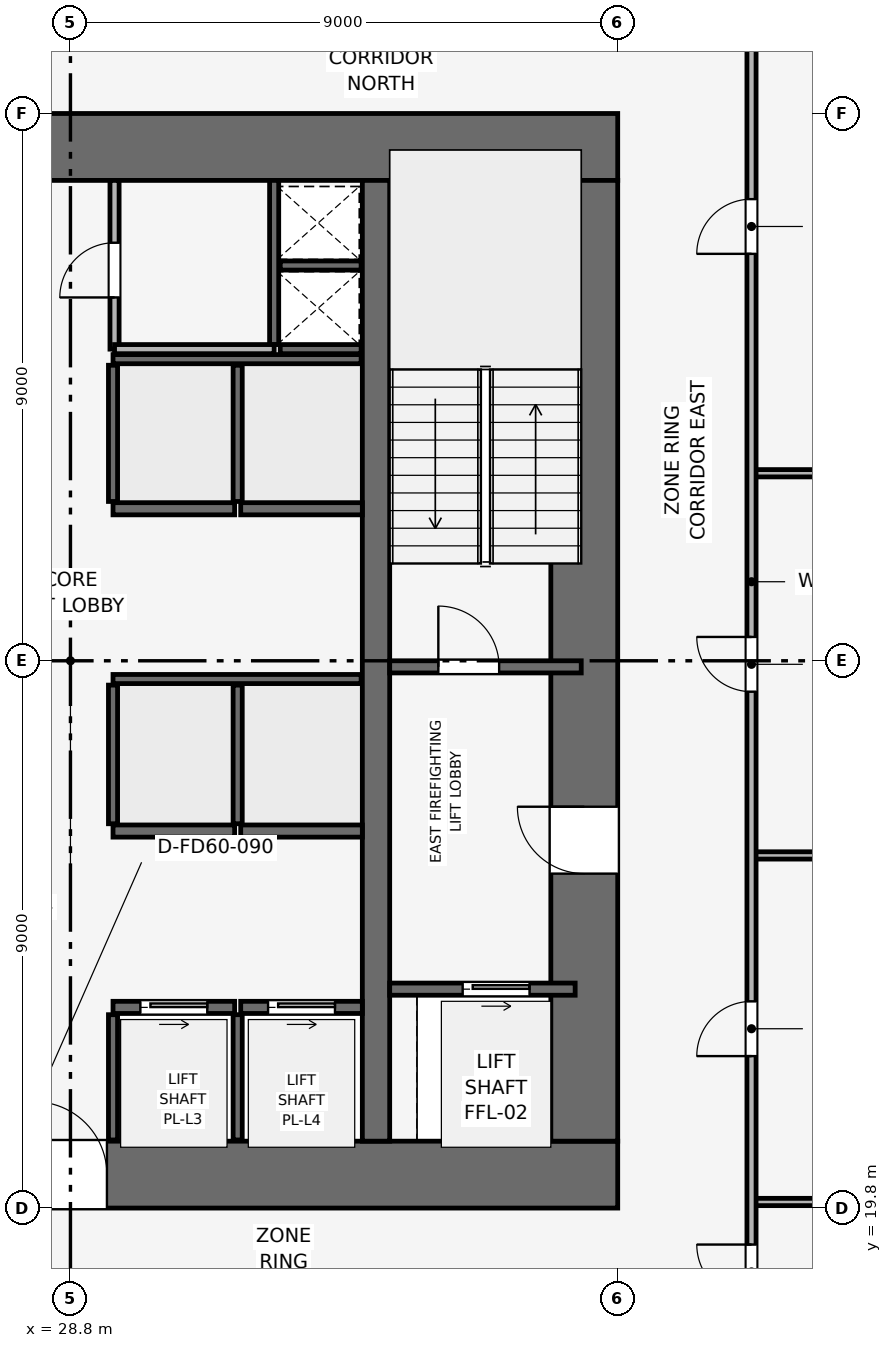
"""IFC4 building model, lengths in metres.
Left out: names, types, materials, properties, quantities, classifications, styles, units other than length and angle.
Written with IfcOpenShell. Run it as: python <this file> out.ifc"""

import sys

from ifc_helpers import new_model, si_unit, direction, frame, frame_2d, origin, place, context, subcontext, project, spatial, rectangle, extrude, element, fill, save


model = new_model("IFC4")
c1 = context("Model", 3, precision=1e-05, world=origin(), true_north=direction((0.0, 1.0)))
c2 = subcontext(c1, "Body", "Model", "MODEL_VIEW")
j1 = project(units=[si_unit("LENGTHUNIT", "METRE"), si_unit("PLANEANGLEUNIT", "RADIAN")], contexts=[c1])
p1 = place(None, origin())
s1 = spatial("IfcSite", under=j1, at=p1, CompositionType="ELEMENT")
p2 = place(p1, origin())
s2 = spatial("IfcBuilding", under=s1, at=p2, CompositionType="ELEMENT")
p3 = place(p2, frame((0.0, 0.0, 37.8)))
s3 = spatial("IfcBuildingStorey", under=s2, at=p3, CompositionType="ELEMENT", Elevation=37.8)
p4 = place(p3, frame((19.8, 20.35, 0.0), z_axis=(0.0, 0.0, 1.0), x_axis=(1.0, 0.0, 0.0)))
e1 = element("IfcWall", 1, at=p4, inside=s3, PredefinedType="SHEAR", context=c2, shape_type="SweptSolid", body=[
    extrude(rectangle(XDim=18.0, YDim=1.1, at=frame_2d((9.0, 0.0))), origin(), (0.0, 0.0, 1.0), 3.9),
])
p5 = place(p4, frame((8.4, 0.0, 0.0)))
e2 = element("IfcOpeningElement", 2, at=p5, cuts=e1, PredefinedType="OPENING", context=c2, shape_type="SweptSolid", body=[
    extrude(rectangle(XDim=1.2, YDim=2.2, at=frame_2d((0.6, 1.1))), frame((0.0, 0.56, 0.0), z_axis=(0.0, -1.0, 0.0), x_axis=(1.0, 0.0, 0.0)), (0.0, 0.0, 1.0), 1.12),
])
p6 = place(p3, frame((19.8, 37.25, 0.0), z_axis=(0.0, 0.0, 1.0), x_axis=(1.0, 0.0, 0.0)))
e3 = element("IfcWall", 3, at=p6, inside=s3, PredefinedType="SHEAR", context=c2, shape_type="SweptSolid", body=[
    extrude(rectangle(XDim=18.0, YDim=1.1, at=frame_2d((9.0, 0.0))), origin(), (0.0, 0.0, 1.0), 3.9),
])
p7 = place(p6, frame((7.05, 0.0, 0.0)))
e4 = element("IfcOpeningElement", 4, at=p7, cuts=e3, PredefinedType="OPENING", context=c2, shape_type="SweptSolid", body=[
    extrude(rectangle(XDim=1.1, YDim=2.15, at=frame_2d((0.55, 1.075))), frame((0.0, 0.56, 0.0), z_axis=(0.0, -1.0, 0.0), x_axis=(1.0, 0.0, 0.0)), (0.0, 0.0, 1.0), 1.12),
])
p8 = place(p3, frame((37.25, 20.9, 0.0), z_axis=(0.0, 0.0, 1.0), x_axis=(0.0, 1.0, 0.0)))
e5 = element("IfcWall", 5, at=p8, inside=s3, PredefinedType="SHEAR", context=c2, shape_type="SweptSolid", body=[
    extrude(rectangle(XDim=15.8, YDim=1.1, at=frame_2d((7.9, 0.0))), origin(), (0.0, 0.0, 1.0), 3.9),
])
p9 = place(p8, frame((4.4, 0.0, 0.0)))
e6 = element("IfcOpeningElement", 6, at=p9, cuts=e5, PredefinedType="OPENING", context=c2, shape_type="SweptSolid", body=[
    extrude(rectangle(XDim=1.1, YDim=2.15, at=frame_2d((0.55, 1.075))), frame((0.0, 0.56, 0.0), z_axis=(0.0, -1.0, 0.0), x_axis=(1.0, 0.0, 0.0)), (0.0, 0.0, 1.0), 1.12),
])
p10 = place(p3, frame((33.825, 20.9, 0.0), z_axis=(0.0, 0.0, 1.0), x_axis=(0.0, 1.0, 0.0)))
e7 = element("IfcWall", 7, at=p10, inside=s3, PredefinedType="SHEAR", context=c2, shape_type="SweptSolid", body=[
    extrude(rectangle(XDim=15.8, YDim=0.45, at=frame_2d((7.9, 0.0))), origin(), (0.0, 0.0, 1.0), 3.9),
])
p11 = place(p3, frame((34.05, 28.7, 0.0), z_axis=(0.0, 0.0, 1.0), x_axis=(1.0, 0.0, 0.0)))
e8 = element("IfcWall", 8, at=p11, inside=s3, PredefinedType="SHEAR", context=c2, shape_type="SweptSolid", body=[
    extrude(rectangle(XDim=3.15, YDim=0.2, at=frame_2d((1.575, 0.0))), origin(), (0.0, 0.0, 1.0), 3.65),
])
p12 = place(p11, frame((0.8, 0.0, 0.0)))
e9 = element("IfcOpeningElement", 9, at=p12, cuts=e8, PredefinedType="OPENING", context=c2, shape_type="SweptSolid", body=[
    extrude(rectangle(XDim=1.0, YDim=2.1, at=frame_2d((0.5, 1.05))), frame((0.0, 0.11, 0.0), z_axis=(0.0, -1.0, 0.0), x_axis=(1.0, 0.0, 0.0)), (0.0, 0.0, 1.0), 0.22),
])
p13 = place(p3, frame((32.15, 34.0, 0.0), z_axis=(0.0, 0.0, 1.0), x_axis=(0.0, 1.0, 0.0)))
e10 = element("IfcWall", 10, at=p13, inside=s3, PredefinedType="SHEAR", context=c2, shape_type="SweptSolid", body=[
    extrude(rectangle(XDim=2.7, YDim=0.15, at=frame_2d((1.35, 0.0))), origin(), (0.0, 0.0, 1.0), 3.65),
])
for number, where, z_axis, x_axis in (
    (11, (32.25, 33.925, 0.0), (0.0, 0.0, 1.0), (1.0, 0.0, 0.0)),
    (12, (32.25, 35.3, 0.0), (0.0, 0.0, 1.0), (1.0, 0.0, 0.0)),
):
    element("IfcWall", number, at=place(p3, frame(where, z_axis=z_axis, x_axis=x_axis)), inside=s3, PredefinedType="SHEAR", context=c2, shape_type="SweptSolid", body=[
        extrude(rectangle(XDim=1.33, YDim=0.15, at=frame_2d((0.665, 0.0))), origin(), (0.0, 0.0, 1.0), 3.65),
    ])
p14 = place(p3, frame((34.05, 23.4, 0.0), z_axis=(0.0, 0.0, 1.0), x_axis=(1.0, 0.0, 0.0)))
e13 = element("IfcWall", 13, at=p14, inside=s3, PredefinedType="SHEAR", context=c2, shape_type="SweptSolid", body=[
    extrude(rectangle(XDim=3.05, YDim=0.2, at=frame_2d((1.525, 0.0))), origin(), (0.0, 0.0, 1.0), 3.65),
])
p15 = place(p14, frame((1.2, 0.0, 0.0)))
e14 = element("IfcOpeningElement", 14, at=p15, cuts=e13, PredefinedType="OPENING", context=c2, shape_type="SweptSolid", body=[
    extrude(rectangle(XDim=1.1, YDim=2.15, at=frame_2d((0.55, 1.075))), frame((0.0, 0.11, 0.0), z_axis=(0.0, -1.0, 0.0), x_axis=(1.0, 0.0, 0.0)), (0.0, 0.0, 1.0), 0.22),
])
p16 = place(p3, frame((29.5, 23.1, 0.0), z_axis=(0.0, 0.0, 1.0), x_axis=(1.0, 0.0, 0.0)))
e15 = element("IfcWall", 15, at=p16, inside=s3, PredefinedType="SHEAR", context=c2, shape_type="SweptSolid", body=[
    extrude(rectangle(XDim=2.0, YDim=0.2, at=frame_2d((1.0, 0.0))), origin(), (0.0, 0.0, 1.0), 3.65),
])
p17 = place(p16, frame((0.45, 0.0, 0.0)))
e16 = element("IfcOpeningElement", 16, at=p17, cuts=e15, PredefinedType="OPENING", context=c2, shape_type="SweptSolid", body=[
    extrude(rectangle(XDim=1.1, YDim=2.15, at=frame_2d((0.55, 1.075))), frame((0.0, 0.11, 0.0), z_axis=(0.0, -1.0, 0.0), x_axis=(1.0, 0.0, 0.0)), (0.0, 0.0, 1.0), 0.22),
])
p18 = place(p3, frame((31.6, 23.1, 0.0), z_axis=(0.0, 0.0, 1.0), x_axis=(1.0, 0.0, 0.0)))
e17 = element("IfcWall", 17, at=p18, inside=s3, PredefinedType="SHEAR", context=c2, shape_type="SweptSolid", body=[
    extrude(rectangle(XDim=2.0, YDim=0.2, at=frame_2d((1.0, 0.0))), origin(), (0.0, 0.0, 1.0), 3.65),
])
p19 = place(p18, frame((0.45, 0.0, 0.0)))
e18 = element("IfcOpeningElement", 18, at=p19, cuts=e17, PredefinedType="OPENING", context=c2, shape_type="SweptSolid", body=[
    extrude(rectangle(XDim=1.1, YDim=2.15, at=frame_2d((0.55, 1.075))), frame((0.0, 0.11, 0.0), z_axis=(0.0, -1.0, 0.0), x_axis=(1.0, 0.0, 0.0)), (0.0, 0.0, 1.0), 0.22),
])
for number, where, z_axis, x_axis in (
    (19, (29.5, 26.0, 0.0), (0.0, 0.0, 1.0), (1.0, 0.0, 0.0)),
    (20, (31.6, 26.0, 0.0), (0.0, 0.0, 1.0), (1.0, 0.0, 0.0)),
    (21, (29.5, 31.3, 0.0), (0.0, 0.0, 1.0), (1.0, 0.0, 0.0)),
    (22, (31.6, 31.3, 0.0), (0.0, 0.0, 1.0), (1.0, 0.0, 0.0)),
):
    element("IfcWall", number, at=place(p3, frame(where, z_axis=z_axis, x_axis=x_axis)), inside=s3, PredefinedType="SHEAR", context=c2, shape_type="SweptSolid", body=[
        extrude(rectangle(XDim=2.0, YDim=0.2, at=frame_2d((1.0, 0.0))), origin(), (0.0, 0.0, 1.0), 3.65),
    ])
for number, where, z_axis, x_axis in (
    (23, (29.5, 20.92, 0.0), (0.0, 0.0, 1.0), (0.0, 1.0, 0.0)),
    (24, (31.55, 20.92, 0.0), (0.0, 0.0, 1.0), (0.0, 1.0, 0.0)),
):
    element("IfcWall", number, at=place(p3, frame(where, z_axis=z_axis, x_axis=x_axis)), inside=s3, PredefinedType="SHEAR", context=c2, shape_type="SweptSolid", body=[
        extrude(rectangle(XDim=2.06, YDim=0.15, at=frame_2d((1.03, 0.0))), origin(), (0.0, 0.0, 1.0), 3.65),
    ])
p20 = place(p3, frame((29.5, 28.5, 0.0), z_axis=(0.0, 0.0, 1.0), x_axis=(1.0, 0.0, 0.0)))
e25 = element("IfcWall", 25, at=p20, inside=s3, PredefinedType="SHEAR", context=c2, shape_type="SweptSolid", body=[
    extrude(rectangle(XDim=4.08, YDim=0.15, at=frame_2d((2.04, 0.0))), origin(), (0.0, 0.0, 1.0), 3.65),
])
for number, where, z_axis, x_axis in (
    (26, (29.5, 26.12, 0.0), (0.0, 0.0, 1.0), (0.0, 1.0, 0.0)),
    (27, (31.55, 26.12, 0.0), (0.0, 0.0, 1.0), (0.0, 1.0, 0.0)),
):
    element("IfcWall", number, at=place(p3, frame(where, z_axis=z_axis, x_axis=x_axis)), inside=s3, PredefinedType="SHEAR", context=c2, shape_type="SweptSolid", body=[
        extrude(rectangle(XDim=2.28, YDim=0.15, at=frame_2d((1.14, 0.0))), origin(), (0.0, 0.0, 1.0), 3.65),
    ])
p21 = place(p3, frame((29.5, 33.76, 0.0), z_axis=(0.0, 0.0, 1.0), x_axis=(1.0, 0.0, 0.0)))
e28 = element("IfcWall", 28, at=p21, inside=s3, PredefinedType="SHEAR", context=c2, shape_type="SweptSolid", body=[
    extrude(rectangle(XDim=4.08, YDim=0.15, at=frame_2d((2.04, 0.0))), origin(), (0.0, 0.0, 1.0), 3.65),
])
for number, where, z_axis, x_axis in (
    (29, (29.5, 31.42, 0.0), (0.0, 0.0, 1.0), (0.0, 1.0, 0.0)),
    (30, (31.55, 31.42, 0.0), (0.0, 0.0, 1.0), (0.0, 1.0, 0.0)),
):
    element("IfcWall", number, at=place(p3, frame(where, z_axis=z_axis, x_axis=x_axis)), inside=s3, PredefinedType="SHEAR", context=c2, shape_type="SweptSolid", body=[
        extrude(rectangle(XDim=2.24, YDim=0.15, at=frame_2d((1.12, 0.0))), origin(), (0.0, 0.0, 1.0), 3.65),
    ])
p22 = place(p3, frame((29.525, 33.925, 0.0), z_axis=(0.0, 0.0, 1.0), x_axis=(0.0, 1.0, 0.0)))
e31 = element("IfcWall", 31, at=p22, inside=s3, PredefinedType="PARTITIONING", context=c2, shape_type="SweptSolid", body=[
    extrude(rectangle(XDim=2.775, YDim=0.15, at=frame_2d((1.387, 0.0))), origin(), (0.0, 0.0, 1.0), 3.65),
])
p23 = place(p22, frame((0.85, 0.0, 0.0)))
e32 = element("IfcOpeningElement", 32, at=p23, cuts=e31, PredefinedType="OPENING", context=c2, shape_type="SweptSolid", body=[
    extrude(rectangle(XDim=0.9, YDim=2.1, at=frame_2d((0.45, 1.05))), frame((0.0, 0.085, 0.0), z_axis=(0.0, -1.0, 0.0), x_axis=(1.0, 0.0, 0.0)), (0.0, 0.0, 1.0), 0.17),
])
p24 = place(p3, frame((29.525, 33.925, 0.0), z_axis=(0.0, 0.0, 1.0), x_axis=(1.0, 0.0, 0.0)))
e33 = element("IfcWall", 33, at=p24, inside=s3, PredefinedType="PARTITIONING", context=c2, shape_type="SweptSolid", body=[
    extrude(rectangle(XDim=2.625, YDim=0.15, at=frame_2d((1.312, 0.0))), origin(), (0.0, 0.0, 1.0), 3.65),
])
for number, where, z_axis, x_axis in (
    (34, (40.0, 19.9, 0.0), (0.0, 0.0, 1.0), (1.0, 0.0, 0.0)),
    (35, (40.0, 25.599, 0.0), (0.0, 0.0, 1.0), (1.0, 0.0, 0.0)),
    (36, (40.0, 31.884, 0.0), (0.0, 0.0, 1.0), (1.0, 0.0, 0.0)),
):
    element("IfcWall", number, at=place(p3, frame(where, z_axis=z_axis, x_axis=x_axis)), inside=s3, PredefinedType="PARTITIONING", context=c2, shape_type="SweptSolid", body=[
        extrude(rectangle(XDim=16.57, YDim=0.12, at=frame_2d((8.285, 0.0))), origin(), (0.0, 0.0, 1.0), 2.935),
    ])
p25 = place(p3, frame((40.0, 17.6, 0.0), z_axis=(0.0, 0.0, 1.0), x_axis=(0.0, 1.0, 0.0)))
e37 = element("IfcWall", 37, at=p25, inside=s3, PredefinedType="PARTITIONING", context=c2, shape_type="SweptSolid", body=[
    extrude(rectangle(XDim=22.4, YDim=0.15, at=frame_2d((11.2, 0.0))), origin(), (0.0, 0.0, 1.0), 3.085),
])
p26 = place(p25, frame((0.7, 0.0, 0.0)))
e38 = element("IfcOpeningElement", 38, at=p26, cuts=e37, PredefinedType="OPENING", context=c2, shape_type="SweptSolid", body=[
    extrude(rectangle(XDim=0.9, YDim=2.1, at=frame_2d((0.45, 1.05))), frame((0.0, 0.085, 0.0), z_axis=(0.0, -1.0, 0.0), x_axis=(1.0, 0.0, 0.0)), (0.0, 0.0, 1.0), 0.17),
])
p27 = place(p25, frame((4.699, 0.0, 0.0)))
e39 = element("IfcOpeningElement", 39, at=p27, cuts=e37, PredefinedType="OPENING", context=c2, shape_type="SweptSolid", body=[
    extrude(rectangle(XDim=0.9, YDim=2.1, at=frame_2d((0.45, 1.05))), frame((0.0, 0.085, 0.0), z_axis=(0.0, -1.0, 0.0), x_axis=(1.0, 0.0, 0.0)), (0.0, 0.0, 1.0), 0.17),
])
p28 = place(p25, frame((10.692, 0.0, 0.0)))
e40 = element("IfcOpeningElement", 40, at=p28, cuts=e37, PredefinedType="OPENING", context=c2, shape_type="SweptSolid", body=[
    extrude(rectangle(XDim=0.9, YDim=2.1, at=frame_2d((0.45, 1.05))), frame((0.0, 0.085, 0.0), z_axis=(0.0, -1.0, 0.0), x_axis=(1.0, 0.0, 0.0)), (0.0, 0.0, 1.0), 0.17),
])
p29 = place(p25, frame((17.892, 0.0, 0.0)))
e41 = element("IfcOpeningElement", 41, at=p29, cuts=e37, PredefinedType="OPENING", context=c2, shape_type="SweptSolid", body=[
    extrude(rectangle(XDim=0.9, YDim=2.1, at=frame_2d((0.45, 1.05))), frame((0.0, 0.085, 0.0), z_axis=(0.0, -1.0, 0.0), x_axis=(1.0, 0.0, 0.0)), (0.0, 0.0, 1.0), 0.17),
])
p30 = place(p12, origin())
e42 = element("IfcDoor", 42, at=p30, inside=s3, OperationType="SINGLE_SWING_LEFT", PredefinedType="DOOR", context=c2, shape_type="SweptSolid", body=[
    extrude(rectangle(XDim=1.0, YDim=2.1, at=frame_2d((0.5, 1.05))), frame((0.0, 0.025, 0.0), z_axis=(0.0, -1.0, 0.0), x_axis=(1.0, 0.0, 0.0)), (0.0, 0.0, 1.0), 0.05),
])
fill(e9, e42)
p31 = place(p15, origin())
e43 = element("IfcDoor", 43, at=p31, inside=s3, OperationType="SLIDING_TO_RIGHT", PredefinedType="DOOR", context=c2, shape_type="SweptSolid", body=[
    extrude(rectangle(XDim=1.1, YDim=2.15, at=frame_2d((0.55, 1.075))), frame((0.0, 0.025, 0.0), z_axis=(0.0, -1.0, 0.0), x_axis=(1.0, 0.0, 0.0)), (0.0, 0.0, 1.0), 0.05),
])
fill(e14, e43)
p32 = place(p17, origin())
e44 = element("IfcDoor", 44, at=p32, inside=s3, OperationType="SLIDING_TO_RIGHT", PredefinedType="DOOR", context=c2, shape_type="SweptSolid", body=[
    extrude(rectangle(XDim=1.1, YDim=2.15, at=frame_2d((0.55, 1.075))), frame((0.0, 0.025, 0.0), z_axis=(0.0, -1.0, 0.0), x_axis=(1.0, 0.0, 0.0)), (0.0, 0.0, 1.0), 0.05),
])
fill(e16, e44)
p33 = place(p19, origin())
e45 = element("IfcDoor", 45, at=p33, inside=s3, OperationType="SLIDING_TO_RIGHT", PredefinedType="DOOR", context=c2, shape_type="SweptSolid", body=[
    extrude(rectangle(XDim=1.1, YDim=2.15, at=frame_2d((0.55, 1.075))), frame((0.0, 0.025, 0.0), z_axis=(0.0, -1.0, 0.0), x_axis=(1.0, 0.0, 0.0)), (0.0, 0.0, 1.0), 0.05),
])
fill(e18, e45)
p34 = place(p23, origin())
e46 = element("IfcDoor", 46, at=p34, inside=s3, OperationType="SINGLE_SWING_LEFT", PredefinedType="DOOR", context=c2, shape_type="SweptSolid", body=[
    extrude(rectangle(XDim=0.9, YDim=2.1, at=frame_2d((0.45, 1.05))), frame((0.0, 0.025, 0.0), z_axis=(0.0, -1.0, 0.0), x_axis=(1.0, 0.0, 0.0)), (0.0, 0.0, 1.0), 0.05),
])
fill(e32, e46)
p35 = place(p26, origin())
e47 = element("IfcDoor", 47, at=p35, inside=s3, OperationType="SINGLE_SWING_RIGHT", PredefinedType="DOOR", context=c2, shape_type="SweptSolid", body=[
    extrude(rectangle(XDim=0.9, YDim=2.1, at=frame_2d((0.45, 1.05))), frame((0.0, 0.025, 0.0), z_axis=(0.0, -1.0, 0.0), x_axis=(1.0, 0.0, 0.0)), (0.0, 0.0, 1.0), 0.05),
])
fill(e38, e47)
p36 = place(p27, origin())
e48 = element("IfcDoor", 48, at=p36, inside=s3, OperationType="SINGLE_SWING_LEFT", PredefinedType="DOOR", context=c2, shape_type="SweptSolid", body=[
    extrude(rectangle(XDim=0.9, YDim=2.1, at=frame_2d((0.45, 1.05))), frame((0.0, 0.025, 0.0), z_axis=(0.0, -1.0, 0.0), x_axis=(1.0, 0.0, 0.0)), (0.0, 0.0, 1.0), 0.05),
])
fill(e39, e48)
p37 = place(p28, origin())
e49 = element("IfcDoor", 49, at=p37, inside=s3, OperationType="SINGLE_SWING_RIGHT", PredefinedType="DOOR", context=c2, shape_type="SweptSolid", body=[
    extrude(rectangle(XDim=0.9, YDim=2.1, at=frame_2d((0.45, 1.05))), frame((0.0, 0.025, 0.0), z_axis=(0.0, -1.0, 0.0), x_axis=(1.0, 0.0, 0.0)), (0.0, 0.0, 1.0), 0.05),
])
fill(e40, e49)
p38 = place(p29, origin())
e50 = element("IfcDoor", 50, at=p38, inside=s3, OperationType="SINGLE_SWING_LEFT", PredefinedType="DOOR", context=c2, shape_type="SweptSolid", body=[
    extrude(rectangle(XDim=0.9, YDim=2.1, at=frame_2d((0.45, 1.05))), frame((0.0, 0.025, 0.0), z_axis=(0.0, -1.0, 0.0), x_axis=(1.0, 0.0, 0.0)), (0.0, 0.0, 1.0), 0.05),
])
fill(e41, e50)
p39 = place(p9, origin())
e51 = element("IfcDoor", 51, at=p39, inside=s3, OperationType="SINGLE_SWING_RIGHT", PredefinedType="DOOR", context=c2, shape_type="SweptSolid", body=[
    extrude(rectangle(XDim=1.1, YDim=2.15, at=frame_2d((0.55, 1.075))), frame((0.0, 0.025, 0.0), z_axis=(0.0, -1.0, 0.0), x_axis=(1.0, 0.0, 0.0)), (0.0, 0.0, 1.0), 0.05),
])
fill(e6, e51)
p40 = place(p5, origin())
e52 = element("IfcDoor", 52, at=p40, inside=s3, OperationType="SINGLE_SWING_LEFT", PredefinedType="DOOR", context=c2, shape_type="SweptSolid", body=[
    extrude(rectangle(XDim=1.2, YDim=2.2, at=frame_2d((0.6, 1.1))), frame((0.0, 0.025, 0.0), z_axis=(0.0, -1.0, 0.0), x_axis=(1.0, 0.0, 0.0)), (0.0, 0.0, 1.0), 0.05),
])
fill(e2, e52)
save(model, sys.argv[1])
